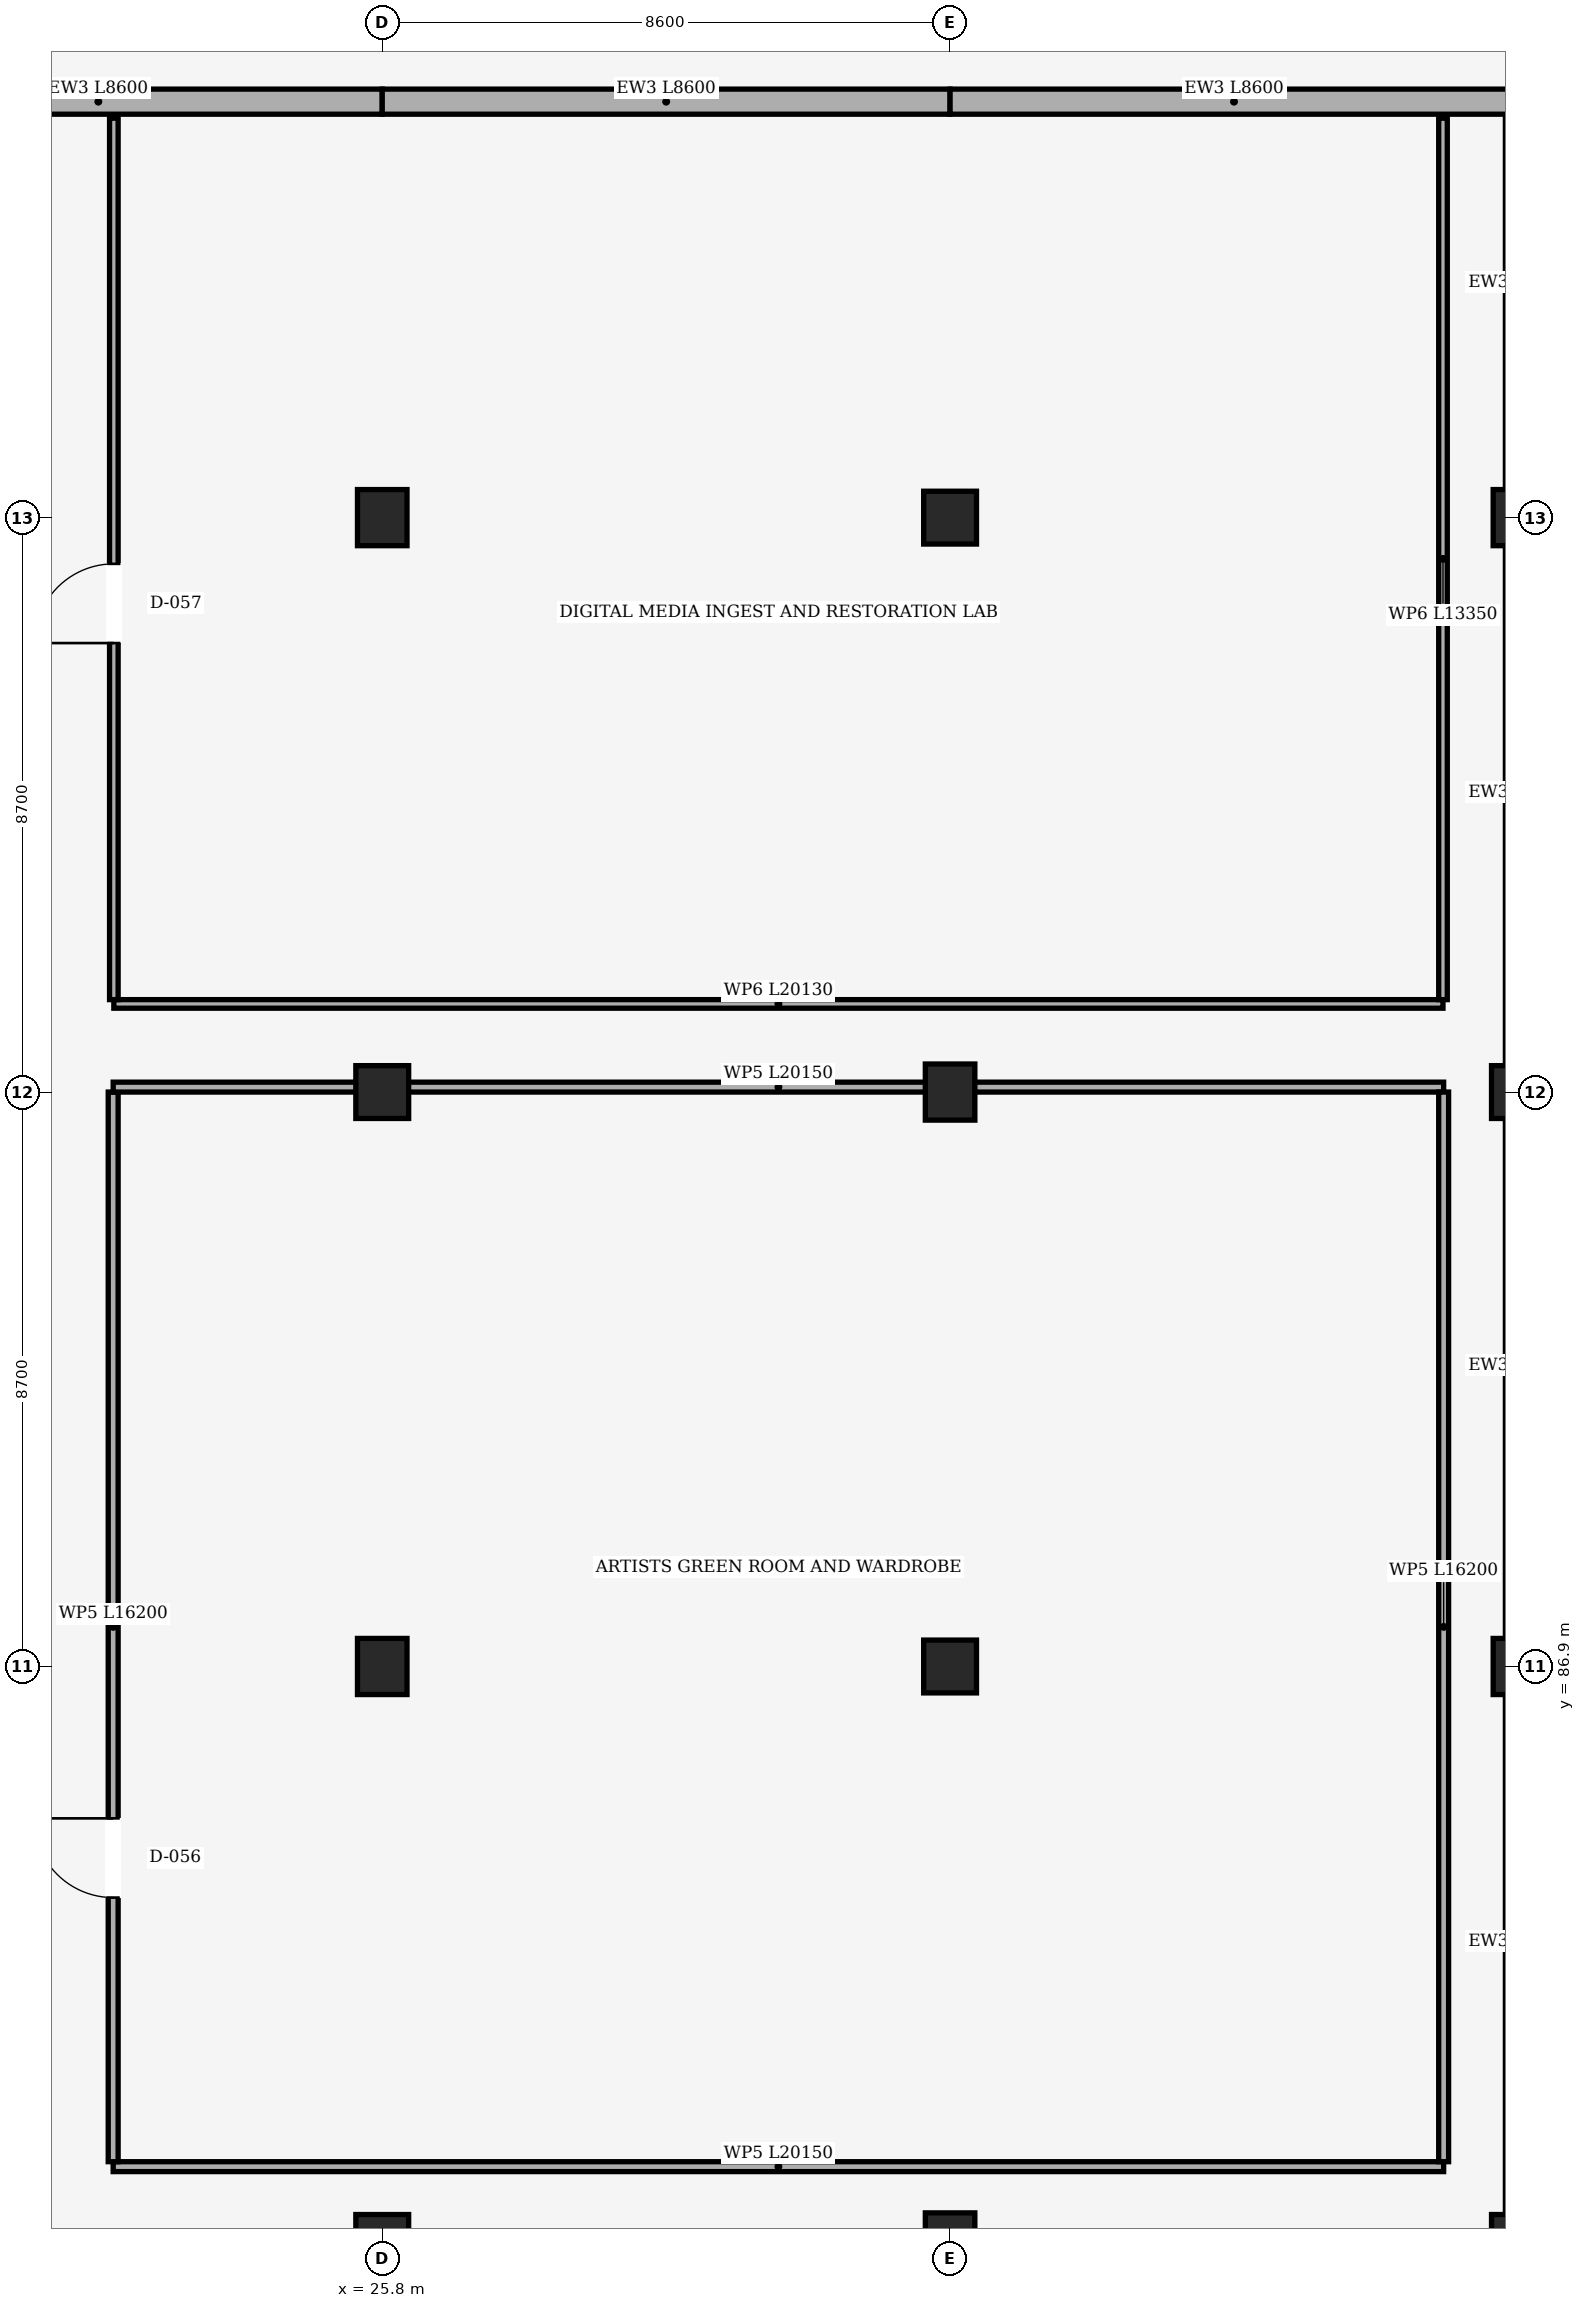
"""IFC4 building model, lengths in metres.
Left out: names, types, materials, properties, quantities, classifications, styles, units other than length and angle.
Written with IfcOpenShell. Run it as: python <this file> out.ifc"""

import sys

from ifc_helpers import new_model, si_unit, direction, frame, frame_2d, origin, origin_2d, place, context, subcontext, project, spatial, rectangle, extrude, element, fill, save


model = new_model("IFC4")
c1 = context("Model", 3, precision=1e-05, world=origin(), true_north=direction((0.0, 1.0)))
c2 = subcontext(c1, "Body", "Model", "MODEL_VIEW")
j1 = project(units=[si_unit("LENGTHUNIT", "METRE"), si_unit("PLANEANGLEUNIT", "RADIAN")], contexts=[c1])
p1 = place(None, origin())
s1 = spatial("IfcSite", under=j1, at=p1, CompositionType="ELEMENT")
p2 = place(p1, origin())
s2 = spatial("IfcBuilding", under=s1, at=p2, CompositionType="ELEMENT")
p3 = place(p2, origin())
s3 = spatial("IfcBuildingStorey", under=s2, at=p3, CompositionType="ELEMENT", Elevation=0.0)
p4 = place(p3, frame((25.8, 78.2, 0.0), z_axis=(0.0, 0.0, 1.0), x_axis=(1.0, 0.0, 0.0)))
e1 = element("IfcColumn", 1, at=p4, inside=s3, PredefinedType="COLUMN", context=c2, shape_type="SweptSolid", body=[
    extrude(rectangle(XDim=0.8, YDim=0.8, at=origin_2d()), origin(), (0.0, 0.0, 1.0), 4.25),
])
p5 = place(p3, frame((25.8, 86.9, 0.0), z_axis=(0.0, 0.0, 1.0), x_axis=(1.0, 0.0, 0.0)))
e2 = element("IfcColumn", 2, at=p5, inside=s3, PredefinedType="COLUMN", context=c2, shape_type="SweptSolid", body=[
    extrude(rectangle(XDim=0.75, YDim=0.85, at=origin_2d()), origin(), (0.0, 0.0, 1.0), 4.25),
])
p6 = place(p3, frame((25.8, 95.6, 0.0), z_axis=(0.0, 0.0, 1.0), x_axis=(1.0, 0.0, 0.0)))
e3 = element("IfcColumn", 3, at=p6, inside=s3, PredefinedType="COLUMN", context=c2, shape_type="SweptSolid", body=[
    extrude(rectangle(XDim=0.8, YDim=0.8, at=origin_2d()), origin(), (0.0, 0.0, 1.0), 4.25),
])
for number, where, z_axis, x_axis in (
    (4, (25.8, 104.3, 0.0), (0.0, 0.0, 1.0), (1.0, 0.0, 0.0)),
    (5, (34.4, 78.2, 0.0), (0.0, 0.0, 1.0), (1.0, 0.0, 0.0)),
):
    element("IfcColumn", number, at=place(p3, frame(where, z_axis=z_axis, x_axis=x_axis)), inside=s3, PredefinedType="COLUMN", context=c2, shape_type="SweptSolid", body=[
        extrude(rectangle(XDim=0.75, YDim=0.85, at=origin_2d()), origin(), (0.0, 0.0, 1.0), 4.25),
    ])
p7 = place(p3, frame((34.4, 86.9, 0.0), z_axis=(0.0, 0.0, 1.0), x_axis=(1.0, 0.0, 0.0)))
e6 = element("IfcColumn", 6, at=p7, inside=s3, PredefinedType="COLUMN", context=c2, shape_type="SweptSolid", body=[
    extrude(rectangle(XDim=0.8, YDim=0.8, at=origin_2d()), origin(), (0.0, 0.0, 1.0), 4.25),
])
p8 = place(p3, frame((34.4, 95.6, 0.0), z_axis=(0.0, 0.0, 1.0), x_axis=(1.0, 0.0, 0.0)))
e7 = element("IfcColumn", 7, at=p8, inside=s3, PredefinedType="COLUMN", context=c2, shape_type="SweptSolid", body=[
    extrude(rectangle(XDim=0.75, YDim=0.85, at=origin_2d()), origin(), (0.0, 0.0, 1.0), 4.25),
])
for number, where, z_axis, x_axis in (
    (8, (34.4, 104.3, 0.0), (0.0, 0.0, 1.0), (1.0, 0.0, 0.0)),
    (9, (43.0, 78.2, 0.0), (0.0, 0.0, 1.0), (1.0, 0.0, 0.0)),
):
    element("IfcColumn", number, at=place(p3, frame(where, z_axis=z_axis, x_axis=x_axis)), inside=s3, PredefinedType="COLUMN", context=c2, shape_type="SweptSolid", body=[
        extrude(rectangle(XDim=0.8, YDim=0.8, at=origin_2d()), origin(), (0.0, 0.0, 1.0), 4.25),
    ])
p9 = place(p3, frame((43.0, 86.9, 0.0), z_axis=(0.0, 0.0, 1.0), x_axis=(1.0, 0.0, 0.0)))
e10 = element("IfcColumn", 10, at=p9, inside=s3, PredefinedType="COLUMN", context=c2, shape_type="SweptSolid", body=[
    extrude(rectangle(XDim=0.75, YDim=0.85, at=origin_2d()), origin(), (0.0, 0.0, 1.0), 4.25),
])
p10 = place(p3, frame((43.0, 95.6, 0.0), z_axis=(0.0, 0.0, 1.0), x_axis=(1.0, 0.0, 0.0)))
e11 = element("IfcColumn", 11, at=p10, inside=s3, PredefinedType="COLUMN", context=c2, shape_type="SweptSolid", body=[
    extrude(rectangle(XDim=0.8, YDim=0.8, at=origin_2d()), origin(), (0.0, 0.0, 1.0), 4.25),
])
p11 = place(p3, frame((43.0, 104.3, 0.0), z_axis=(0.0, 0.0, 1.0), x_axis=(1.0, 0.0, 0.0)))
e12 = element("IfcColumn", 12, at=p11, inside=s3, PredefinedType="COLUMN", context=c2, shape_type="SweptSolid", body=[
    extrude(rectangle(XDim=0.75, YDim=0.85, at=origin_2d()), origin(), (0.0, 0.0, 1.0), 4.25),
])
p12 = place(p3, frame((17.2, 110.6, 0.0), z_axis=(0.0, 0.0, 1.0), x_axis=(1.0, 0.0, 0.0)))
e13 = element("IfcWall", 13, at=p12, inside=s3, PredefinedType="SOLIDWALL", context=c2, shape_type="SweptSolid", body=[
    extrude(rectangle(XDim=8.6, YDim=0.38, at=frame_2d((4.3, 0.0))), origin(), (0.0, 0.0, 1.0), 4.235),
])
p13 = place(p3, frame((25.8, 110.6, 0.0), z_axis=(0.0, 0.0, 1.0), x_axis=(1.0, 0.0, 0.0)))
e14 = element("IfcWall", 14, at=p13, inside=s3, PredefinedType="SOLIDWALL", context=c2, shape_type="SweptSolid", body=[
    extrude(rectangle(XDim=8.6, YDim=0.38, at=frame_2d((4.3, 0.0))), origin(), (0.0, 0.0, 1.0), 4.235),
])
p14 = place(p3, frame((34.4, 110.6, 0.0), z_axis=(0.0, 0.0, 1.0), x_axis=(1.0, 0.0, 0.0)))
e15 = element("IfcWall", 15, at=p14, inside=s3, PredefinedType="SOLIDWALL", context=c2, shape_type="SweptSolid", body=[
    extrude(rectangle(XDim=8.6, YDim=0.38, at=frame_2d((4.3, 0.0))), origin(), (0.0, 0.0, 1.0), 4.235),
])
p15 = place(p3, frame((41.875, 79.325, 0.0), z_axis=(0.0, 0.0, 1.0), x_axis=(-1.0, 0.0, 0.0)))
e16 = element("IfcWall", 16, at=p15, inside=s3, PredefinedType="PARTITIONING", context=c2, shape_type="SweptSolid", body=[
    extrude(rectangle(XDim=20.15, YDim=0.15, at=frame_2d((10.075, 0.0))), origin(), (0.0, 0.0, 1.0), 4.23),
])
p16 = place(p3, frame((21.725, 79.4, 0.0), z_axis=(0.0, 0.0, 1.0), x_axis=(0.0, 1.0, 0.0)))
e17 = element("IfcWall", 17, at=p16, inside=s3, PredefinedType="PARTITIONING", context=c2, shape_type="SweptSolid", body=[
    extrude(rectangle(XDim=16.2, YDim=0.15, at=frame_2d((8.1, 0.0))), origin(), (0.0, 0.0, 1.0), 4.23),
])
p17 = place(p16, frame((4.0, 0.0, 0.0)))
e18 = element("IfcOpeningElement", 18, at=p17, cuts=e17, PredefinedType="OPENING", context=c2, shape_type="SweptSolid", body=[
    extrude(rectangle(XDim=1.2, YDim=2.15, at=frame_2d((0.6, 1.075))), frame((0.0, 0.075, 0.0), z_axis=(0.0, -1.0, 0.0), x_axis=(1.0, 0.0, 0.0)), (0.0, 0.0, 1.0), 0.15),
])
p18 = place(p3, frame((21.725, 95.675, 0.0), z_axis=(0.0, 0.0, 1.0), x_axis=(1.0, 0.0, 0.0)))
e19 = element("IfcWall", 19, at=p18, inside=s3, PredefinedType="PARTITIONING", context=c2, shape_type="SweptSolid", body=[
    extrude(rectangle(XDim=20.15, YDim=0.15, at=frame_2d((10.075, 0.0))), origin(), (0.0, 0.0, 1.0), 3.38),
])
p19 = place(p3, frame((41.875, 95.6, 0.0), z_axis=(0.0, 0.0, 1.0), x_axis=(0.0, -1.0, 0.0)))
e20 = element("IfcWall", 20, at=p19, inside=s3, PredefinedType="PARTITIONING", context=c2, shape_type="SweptSolid", body=[
    extrude(rectangle(XDim=16.2, YDim=0.15, at=frame_2d((8.1, 0.0))), origin(), (0.0, 0.0, 1.0), 4.23),
])
p20 = place(p3, frame((41.865, 96.935, 0.0), z_axis=(0.0, 0.0, 1.0), x_axis=(-1.0, 0.0, 0.0)))
e21 = element("IfcWall", 21, at=p20, inside=s3, PredefinedType="PARTITIONING", context=c2, shape_type="SweptSolid", body=[
    extrude(rectangle(XDim=20.13, YDim=0.13, at=frame_2d((10.065, 0.0))), origin(), (0.0, 0.0, 1.0), 4.23),
])
p21 = place(p3, frame((21.735, 97.0, 0.0), z_axis=(0.0, 0.0, 1.0), x_axis=(0.0, 1.0, 0.0)))
e22 = element("IfcWall", 22, at=p21, inside=s3, PredefinedType="PARTITIONING", context=c2, shape_type="SweptSolid", body=[
    extrude(rectangle(XDim=13.35, YDim=0.13, at=frame_2d((6.675, 0.0))), origin(), (0.0, 0.0, 1.0), 4.23),
])
p22 = place(p21, frame((5.4, 0.0, 0.0)))
e23 = element("IfcOpeningElement", 23, at=p22, cuts=e22, PredefinedType="OPENING", context=c2, shape_type="SweptSolid", body=[
    extrude(rectangle(XDim=1.2, YDim=2.15, at=frame_2d((0.6, 1.075))), frame((0.0, 0.065, 0.0), z_axis=(0.0, -1.0, 0.0), x_axis=(1.0, 0.0, 0.0)), (0.0, 0.0, 1.0), 0.13),
])
p23 = place(p3, frame((41.865, 110.35, 0.0), z_axis=(0.0, 0.0, 1.0), x_axis=(0.0, -1.0, 0.0)))
e24 = element("IfcWall", 24, at=p23, inside=s3, PredefinedType="PARTITIONING", context=c2, shape_type="SweptSolid", body=[
    extrude(rectangle(XDim=13.35, YDim=0.13, at=frame_2d((6.675, 0.0))), origin(), (0.0, 0.0, 1.0), 4.23),
])
p24 = place(p17, origin())
e25 = element("IfcDoor", 25, at=p24, inside=s3, OperationType="SINGLE_SWING_RIGHT", PredefinedType="DOOR", context=c2, shape_type="SweptSolid", body=[
    extrude(rectangle(XDim=1.2, YDim=2.15, at=frame_2d((0.6, 1.075))), frame((0.0, 0.025, 0.0), z_axis=(0.0, -1.0, 0.0), x_axis=(1.0, 0.0, 0.0)), (0.0, 0.0, 1.0), 0.05),
])
fill(e18, e25)
p25 = place(p22, origin())
e26 = element("IfcDoor", 26, at=p25, inside=s3, OperationType="SINGLE_SWING_LEFT", PredefinedType="DOOR", context=c2, shape_type="SweptSolid", body=[
    extrude(rectangle(XDim=1.2, YDim=2.15, at=frame_2d((0.6, 1.075))), frame((0.0, 0.025, 0.0), z_axis=(0.0, -1.0, 0.0), x_axis=(1.0, 0.0, 0.0)), (0.0, 0.0, 1.0), 0.05),
])
fill(e23, e26)
save(model, sys.argv[1])
